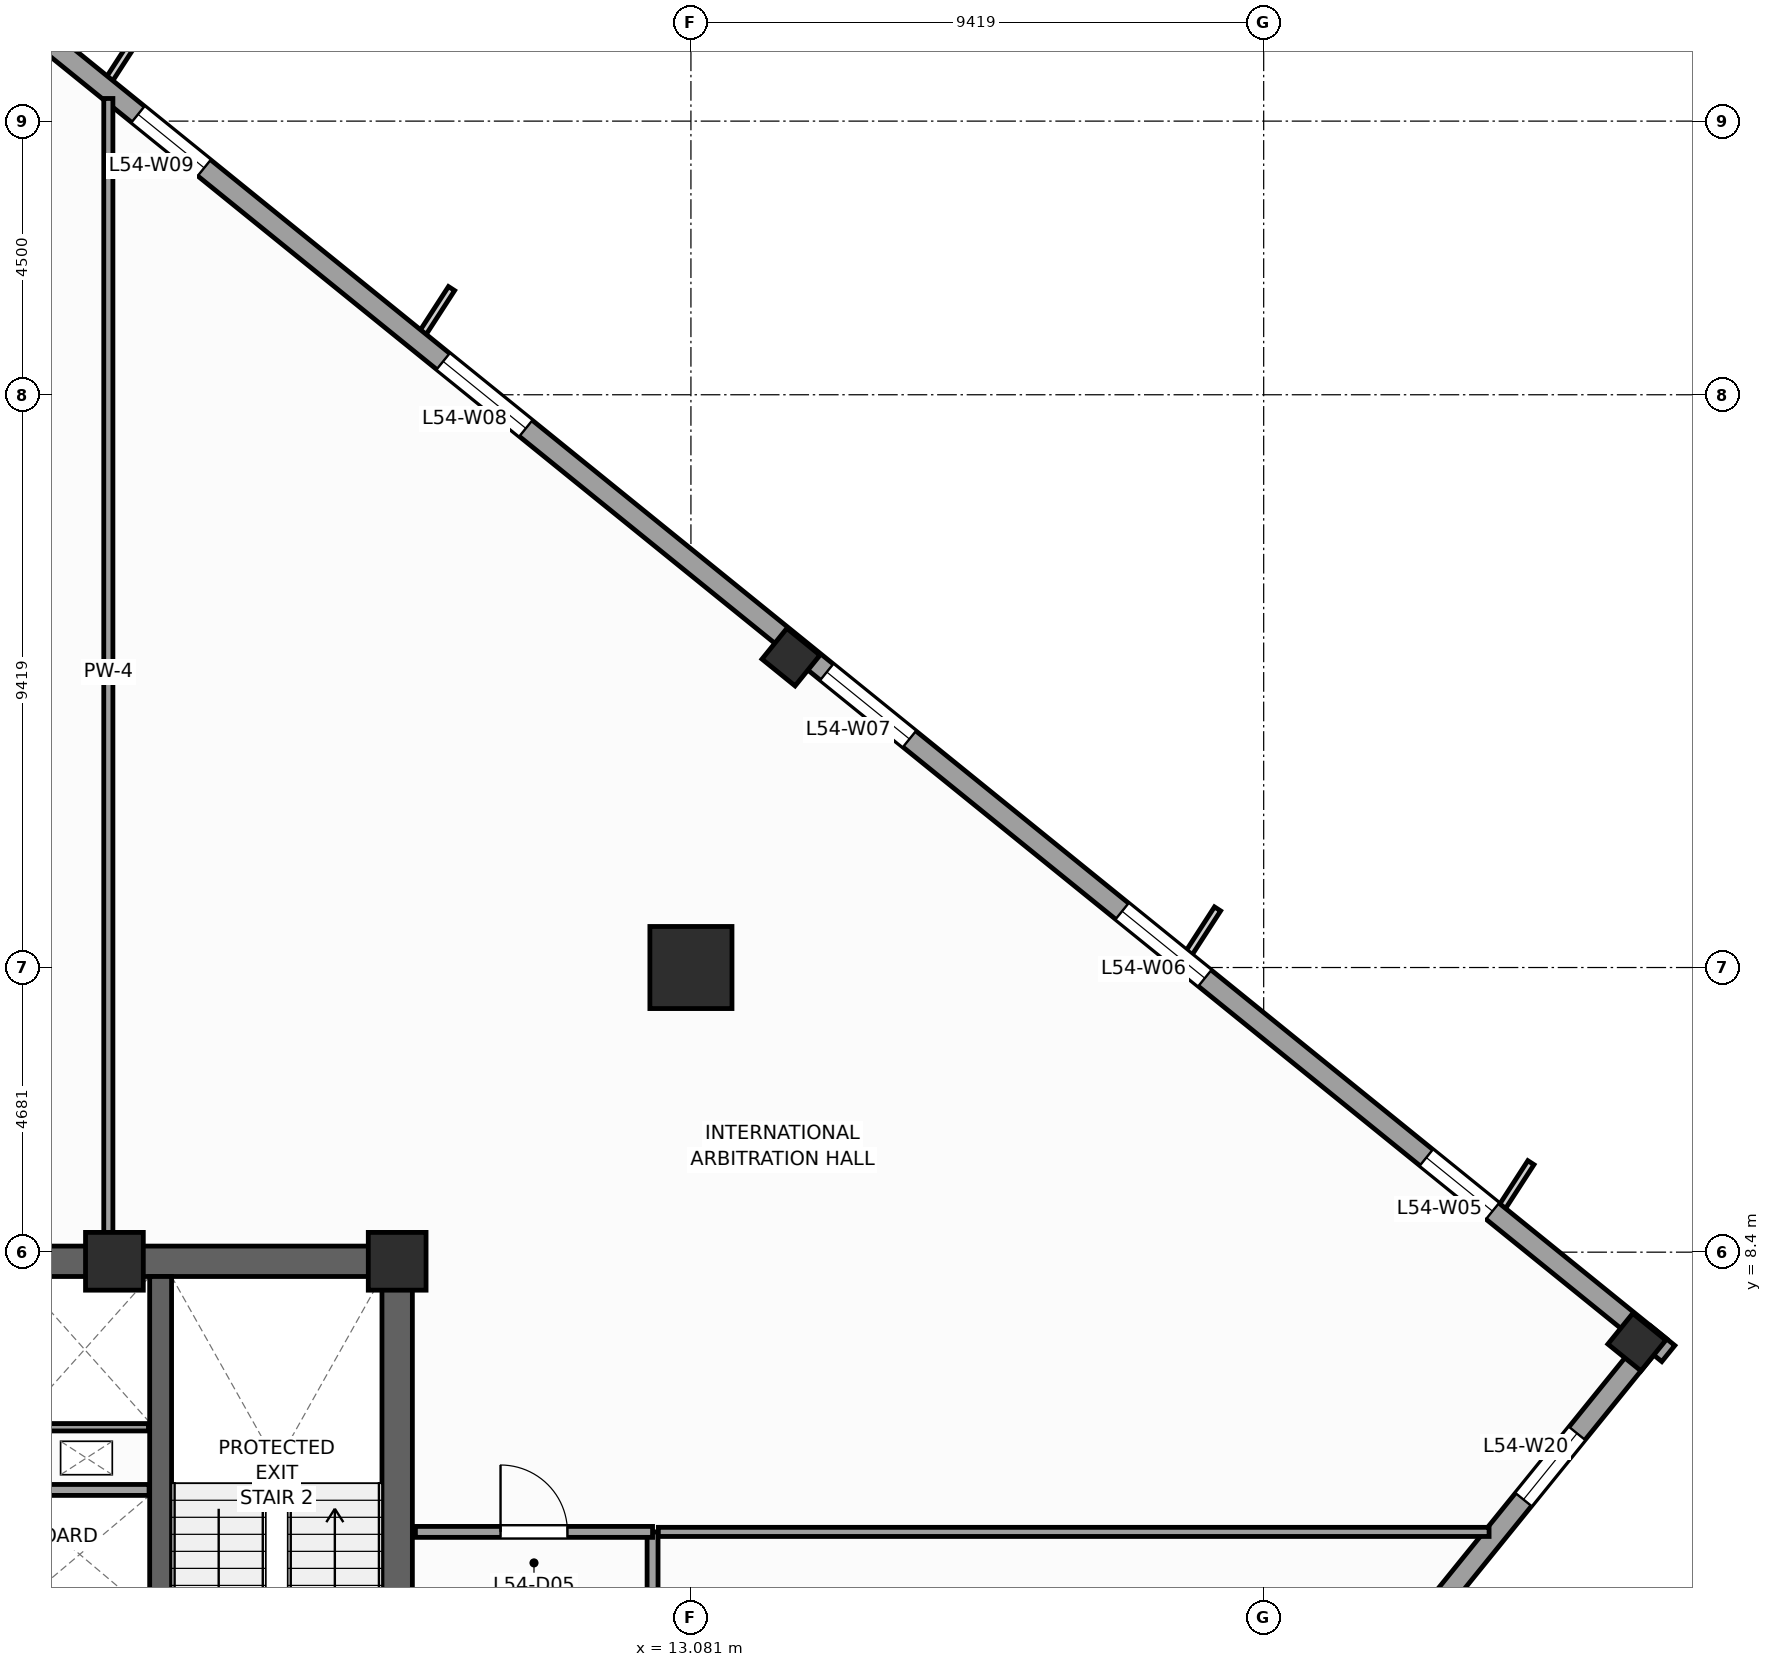
"""IFC4 building model, lengths in metres.
Left out: names, types, materials, properties, quantities, classifications, styles, units other than length and angle.
Written with IfcOpenShell. Run it as: python <this file> out.ifc"""

import sys

from ifc_helpers import new_model, si_unit, direction, frame, frame_2d, origin, origin_2d, place, context, subcontext, project, spatial, rectangle, extrude, source, transform, mapped, element, fill, save


model = new_model("IFC4")
c1 = context("Model", 3, precision=1e-05, world=origin(), true_north=direction((0.0, 1.0)))
c2 = subcontext(c1, "Body", "Model", "MODEL_VIEW")
j1 = project(units=[si_unit("LENGTHUNIT", "METRE"), si_unit("PLANEANGLEUNIT", "RADIAN")], contexts=[c1])
p1 = place(None, origin())
s1 = spatial("IfcSite", under=j1, at=p1, CompositionType="ELEMENT")
p2 = place(p1, origin())
s2 = spatial("IfcBuilding", under=s1, at=p2, CompositionType="ELEMENT")
p3 = place(p2, frame((0.0, 0.0, 225.1)))
s3 = spatial("IfcBuildingStorey", under=s2, at=p3, CompositionType="ELEMENT", Elevation=225.1)
p4 = place(p3, frame((-8.5, 8.25, 0.0), z_axis=(0.0, 0.0, 1.0), x_axis=(1.0, 0.0, 0.0)))
e1 = element("IfcWall", 1, at=p4, inside=s3, PredefinedType="SHEAR", context=c2, shape_type="SweptSolid", body=[
    extrude(rectangle(XDim=17.0, YDim=0.5, at=frame_2d((8.5, 0.0))), origin(), (0.0, 0.0, 1.0), 3.9),
])
p5 = place(p3, frame((8.25, -8.0, 0.0), z_axis=(0.0, 0.0, 1.0), x_axis=(0.0, 1.0, 0.0)))
e2 = element("IfcWall", 2, at=p5, inside=s3, PredefinedType="SHEAR", context=c2, shape_type="SweptSolid", body=[
    extrude(rectangle(XDim=16.0, YDim=0.5, at=frame_2d((8.0, 0.0))), origin(), (0.0, 0.0, 1.0), 3.9),
])
p6 = place(p5, frame((4.69, 0.0, 0.0)))
e3 = element("IfcOpeningElement", 3, at=p6, cuts=e2, PredefinedType="OPENING", context=c2, shape_type="SweptSolid", body=[
    extrude(rectangle(XDim=1.3, YDim=2.2, at=frame_2d((0.65, 1.1))), frame((0.0, 0.26, 0.0), z_axis=(0.0, -1.0, 0.0), x_axis=(1.0, 0.0, 0.0)), (0.0, 0.0, 1.0), 0.52),
])
p7 = place(p3, frame((4.36, -8.0, 0.0), z_axis=(0.0, 0.0, 1.0), x_axis=(0.0, 1.0, 0.0)))
e4 = element("IfcWall", 4, at=p7, inside=s3, PredefinedType="SHEAR", context=c2, shape_type="SweptSolid", body=[
    extrude(rectangle(XDim=16.0, YDim=0.36, at=frame_2d((8.0, 0.0))), origin(), (0.0, 0.0, 1.0), 3.9),
])
m1 = source(origin(), c2, "Body", "SweptSolid", [
    extrude(rectangle(XDim=0.95, YDim=0.95, at=origin_2d()), origin(), (0.0, 0.0, 1.0), 3.9),
])
for number, where, z_axis, x_axis in (
    (5, (8.25, 8.25, 0.0), (0.0, 0.0, 1.0), (1.0, 0.0, 0.0)),
    (6, (3.6, 8.25, 0.0), (0.0, 0.0, 1.0), (1.0, 0.0, 0.0)),
):
    element("IfcColumn", number, at=place(p3, frame(where, z_axis=z_axis, x_axis=x_axis)), inside=s3, PredefinedType="PILASTER", context=c2, shape_type="MappedRepresentation", body=[
        mapped(m1, transform((0.0, 0.0, 0.0), scale=1.0)),
    ])
m2 = source(origin(), c2, "Body", "SweptSolid", [
    extrude(rectangle(XDim=1.35, YDim=1.35, at=origin_2d()), origin(), (0.0, 0.0, 1.0), 3.9),
])
p8 = place(p3, frame((13.081, 13.081, 0.0), z_axis=(0.0, 0.0, 1.0), x_axis=(1.0, 0.0, 0.0)))
e7 = element("IfcColumn", 7, at=p8, inside=s3, PredefinedType="COLUMN", context=c2, shape_type="MappedRepresentation", body=[
    mapped(m2, transform((0.0, 0.0, 0.0), scale=1.0)),
])
m3 = source(origin(), c2, "Body", "SweptSolid", [
    extrude(rectangle(XDim=0.65, YDim=0.7, at=origin_2d()), origin(), (0.0, 0.0, 1.0), 3.9),
])
for number, where, z_axis, x_axis in (
    (8, (28.637, 6.92, 0.0), (0.0, 0.0, 1.0), (0.629, 0.777, 0.0)),
    (9, (14.726, 18.185, 0.0), (0.0, 0.0, 1.0), (0.629, 0.777, 0.0)),
):
    element("IfcColumn", number, at=place(p3, frame(where, z_axis=z_axis, x_axis=x_axis)), inside=s3, PredefinedType="COLUMN", context=c2, shape_type="MappedRepresentation", body=[
        mapped(m3, transform((0.0, 0.0, 0.0), scale=1.0)),
    ])
p9 = place(p3, frame((25.429, 2.673, 0.0), z_axis=(0.0, 0.0, 1.0), x_axis=(0.629299794138, 0.777162640055, 0.0)))
e10 = element("IfcWall", 10, at=p9, inside=s3, PredefinedType="STANDARD", context=c2, shape_type="SweptSolid", body=[
    extrude(rectangle(XDim=5.67, YDim=0.34, at=frame_2d((2.835, 0.0))), origin(), (0.0, 0.0, 1.0), 3.66),
])
p10 = place(p9, frame((2.135, 0.0, 0.48)))
e11 = element("IfcOpeningElement", 11, at=p10, cuts=e10, PredefinedType="OPENING", context=c2, shape_type="SweptSolid", body=[
    extrude(rectangle(XDim=1.4, YDim=2.4, at=frame_2d((0.7, 1.2))), frame((0.0, 0.18, 0.0), z_axis=(0.0, -1.0, 0.0), x_axis=(1.0, 0.0, 0.0)), (0.0, 0.0, 1.0), 0.36),
])
p11 = place(p3, frame((29.154, 6.733, 0.0), z_axis=(0.0, 0.0, 1.0), x_axis=(-0.77714192302, 0.629325378072, 0.0)))
e12 = element("IfcWall", 12, at=p11, inside=s3, PredefinedType="STANDARD", context=c2, shape_type="SweptSolid", body=[
    extrude(rectangle(XDim=36.84, YDim=0.34, at=frame_2d((18.42, 0.0))), origin(), (0.0, 0.0, 1.0), 2.96),
])
p12 = place(p11, frame((3.721, 0.0, 0.48)))
e13 = element("IfcOpeningElement", 13, at=p12, cuts=e12, PredefinedType="OPENING", context=c2, shape_type="SweptSolid", body=[
    extrude(rectangle(XDim=1.4, YDim=2.4, at=frame_2d((0.7, 1.2))), frame((0.0, 0.18, 0.0), z_axis=(0.0, -1.0, 0.0), x_axis=(1.0, 0.0, 0.0)), (0.0, 0.0, 1.0), 0.36),
])
p13 = place(p11, frame((9.809, 0.0, 0.58)))
e14 = element("IfcOpeningElement", 14, at=p13, cuts=e12, PredefinedType="OPENING", context=c2, shape_type="SweptSolid", body=[
    extrude(rectangle(XDim=1.75, YDim=2.3, at=frame_2d((0.875, 1.15))), frame((0.0, 0.18, 0.0), z_axis=(0.0, -1.0, 0.0), x_axis=(1.0, 0.0, 0.0)), (0.0, 0.0, 1.0), 0.36),
])
p14 = place(p11, frame((16.058, 0.0, 0.58)))
e15 = element("IfcOpeningElement", 15, at=p14, cuts=e12, PredefinedType="OPENING", context=c2, shape_type="SweptSolid", body=[
    extrude(rectangle(XDim=1.75, YDim=2.3, at=frame_2d((0.875, 1.15))), frame((0.0, 0.18, 0.0), z_axis=(0.0, -1.0, 0.0), x_axis=(1.0, 0.0, 0.0)), (0.0, 0.0, 1.0), 0.36),
])
p15 = place(p11, frame((24.176, 0.0, 0.58)))
e16 = element("IfcOpeningElement", 16, at=p15, cuts=e12, PredefinedType="OPENING", context=c2, shape_type="SweptSolid", body=[
    extrude(rectangle(XDim=1.75, YDim=2.3, at=frame_2d((0.875, 1.15))), frame((0.0, 0.18, 0.0), z_axis=(0.0, -1.0, 0.0), x_axis=(1.0, 0.0, 0.0)), (0.0, 0.0, 1.0), 0.36),
])
p16 = place(p11, frame((30.982, 0.0, 0.48)))
e17 = element("IfcOpeningElement", 17, at=p16, cuts=e12, PredefinedType="OPENING", context=c2, shape_type="SweptSolid", body=[
    extrude(rectangle(XDim=1.4, YDim=2.4, at=frame_2d((0.7, 1.2))), frame((0.0, 0.18, 0.0), z_axis=(0.0, -1.0, 0.0), x_axis=(1.0, 0.0, 0.0)), (0.0, 0.0, 1.0), 0.36),
])
p17 = place(p3, frame((1.89, 4.49, 0.0), z_axis=(0.0, 0.0, 1.0), x_axis=(1.0, 0.0, 0.0)))
e18 = element("IfcWall", 18, at=p17, inside=s3, PredefinedType="PARTITIONING", context=c2, shape_type="SweptSolid", body=[
    extrude(rectangle(XDim=2.28, YDim=0.18, at=frame_2d((1.14, 0.0))), origin(), (0.0, 0.0, 1.0), 3.66),
])
p18 = place(p3, frame((2.06, 5.52, 0.0), z_axis=(0.0, 0.0, 1.0), x_axis=(1.0, 0.0, 0.0)))
e19 = element("IfcWall", 19, at=p18, inside=s3, PredefinedType="PARTITIONING", context=c2, shape_type="SweptSolid", body=[
    extrude(rectangle(XDim=2.1, YDim=0.12, at=frame_2d((1.05, 0.0))), origin(), (0.0, 0.0, 1.0), 3.66),
])
p19 = place(p3, frame((12.45, -12.35, 0.0), z_axis=(0.0, 0.0, 1.0), x_axis=(0.0, 1.0, 0.0)))
e20 = element("IfcWall", 20, at=p19, inside=s3, PredefinedType="PARTITIONING", context=c2, shape_type="SweptSolid", body=[
    extrude(rectangle(XDim=16.15, YDim=0.18, at=frame_2d((8.075, 0.0))), origin(), (0.0, 0.0, 1.0), 3.66),
])
p20 = place(p19, frame((1.58, 0.0, 0.0)))
e21 = element("IfcOpeningElement", 21, at=p20, cuts=e20, PredefinedType="OPENING", context=c2, shape_type="SweptSolid", body=[
    extrude(rectangle(XDim=0.95, YDim=2.1, at=frame_2d((0.475, 1.05))), frame((0.0, 0.1, 0.0), z_axis=(0.0, -1.0, 0.0), x_axis=(1.0, 0.0, 0.0)), (0.0, 0.0, 1.0), 0.2),
])
p21 = place(p19, frame((14.111, 0.0, 0.0)))
e22 = element("IfcOpeningElement", 22, at=p21, cuts=e20, PredefinedType="OPENING", context=c2, shape_type="SweptSolid", body=[
    extrude(rectangle(XDim=1.1, YDim=2.2, at=frame_2d((0.55, 1.1))), frame((0.0, 0.1, 0.0), z_axis=(0.0, -1.0, 0.0), x_axis=(1.0, 0.0, 0.0)), (0.0, 0.0, 1.0), 0.2),
])
p22 = place(p19, frame((7.784, 0.0, 0.0)))
e23 = element("IfcOpeningElement", 23, at=p22, cuts=e20, PredefinedType="OPENING", context=c2, shape_type="SweptSolid", body=[
    extrude(rectangle(XDim=1.1, YDim=2.2, at=frame_2d((0.55, 1.1))), frame((0.0, 0.1, 0.0), z_axis=(0.0, -1.0, 0.0), x_axis=(1.0, 0.0, 0.0)), (0.0, 0.0, 1.0), 0.2),
])
p23 = place(p3, frame((8.55, 3.8, 0.0), z_axis=(0.0, 0.0, 1.0), x_axis=(1.0, 0.0, 0.0)))
e24 = element("IfcWall", 24, at=p23, inside=s3, PredefinedType="PARTITIONING", context=c2, shape_type="SweptSolid", body=[
    extrude(rectangle(XDim=3.9, YDim=0.18, at=frame_2d((1.95, 0.0))), origin(), (0.0, 0.0, 1.0), 3.66),
])
p24 = place(p23, frame((1.4, 0.0, 0.0)))
e25 = element("IfcOpeningElement", 25, at=p24, cuts=e24, PredefinedType="OPENING", context=c2, shape_type="SweptSolid", body=[
    extrude(rectangle(XDim=1.1, YDim=2.2, at=frame_2d((0.55, 1.1))), frame((0.0, 0.1, 0.0), z_axis=(0.0, -1.0, 0.0), x_axis=(1.0, 0.0, 0.0)), (0.0, 0.0, 1.0), 0.2),
])
p25 = place(p3, frame((3.5, 8.505, 0.0), z_axis=(0.0, 0.0, 1.0), x_axis=(0.0, 1.0, 0.0)))
e26 = element("IfcWall", 26, at=p25, inside=s3, PredefinedType="PARTITIONING", context=c2, shape_type="SweptSolid", body=[
    extrude(rectangle(XDim=18.868, YDim=0.15, at=frame_2d((9.434, 0.0))), origin(), (0.0, 0.0, 1.0), 3.66),
])
p26 = place(p3, frame((12.545, 3.8, 0.0), z_axis=(0.0, 0.0, 1.0), x_axis=(1.0, 0.0, 0.0)))
e27 = element("IfcWall", 27, at=p26, inside=s3, PredefinedType="PARTITIONING", context=c2, shape_type="SweptSolid", body=[
    extrude(rectangle(XDim=13.662, YDim=0.15, at=frame_2d((6.831, 0.0))), origin(), (0.0, 0.0, 1.0), 3.66),
])
m4 = source(origin(), c2, "Body", "SweptSolid", [
    extrude(rectangle(XDim=1.4, YDim=2.4, at=frame_2d((0.7, 1.2))), frame((0.0, 0.03, 0.0), z_axis=(0.0, -1.0, 0.0), x_axis=(1.0, 0.0, 0.0)), (0.0, 0.0, 1.0), 0.06),
])
p27 = place(p12, origin())
e28 = element("IfcWindow", 28, at=p27, inside=s3, PartitioningType="SINGLE_PANEL", PredefinedType="WINDOW", context=c2, shape_type="MappedRepresentation", body=[
    mapped(m4, transform((0.0, 0.0, 0.0), scale=1.0)),
])
fill(e13, e28)
m5 = source(origin(), c2, "Body", "SweptSolid", [
    extrude(rectangle(XDim=1.75, YDim=2.3, at=frame_2d((0.875, 1.15))), frame((0.0, 0.03, 0.0), z_axis=(0.0, -1.0, 0.0), x_axis=(1.0, 0.0, 0.0)), (0.0, 0.0, 1.0), 0.06),
])
p28 = place(p13, origin())
e29 = element("IfcWindow", 29, at=p28, inside=s3, PartitioningType="SINGLE_PANEL", PredefinedType="WINDOW", context=c2, shape_type="MappedRepresentation", body=[
    mapped(m5, transform((0.0, 0.0, 0.0), scale=1.0)),
])
fill(e14, e29)
p29 = place(p14, origin())
e30 = element("IfcWindow", 30, at=p29, inside=s3, PartitioningType="SINGLE_PANEL", PredefinedType="WINDOW", context=c2, shape_type="MappedRepresentation", body=[
    mapped(m5, transform((0.0, 0.0, 0.0), scale=1.0)),
])
fill(e15, e30)
p30 = place(p15, origin())
e31 = element("IfcWindow", 31, at=p30, inside=s3, PartitioningType="SINGLE_PANEL", PredefinedType="WINDOW", context=c2, shape_type="MappedRepresentation", body=[
    mapped(m5, transform((0.0, 0.0, 0.0), scale=1.0)),
])
fill(e16, e31)
p31 = place(p16, origin())
e32 = element("IfcWindow", 32, at=p31, inside=s3, PartitioningType="SINGLE_PANEL", PredefinedType="WINDOW", context=c2, shape_type="MappedRepresentation", body=[
    mapped(m4, transform((0.0, 0.0, 0.0), scale=1.0)),
])
fill(e17, e32)
p32 = place(p10, origin())
e33 = element("IfcWindow", 33, at=p32, inside=s3, PartitioningType="SINGLE_PANEL", PredefinedType="WINDOW", context=c2, shape_type="MappedRepresentation", body=[
    mapped(m4, transform((0.0, 0.0, 0.0), scale=1.0)),
])
fill(e11, e33)
m6 = source(origin(), c2, "Body", "SweptSolid", [
    extrude(rectangle(XDim=1.1, YDim=2.2, at=frame_2d((0.55, 1.1))), frame((0.0, 0.025, 0.0), z_axis=(0.0, -1.0, 0.0), x_axis=(1.0, 0.0, 0.0)), (0.0, 0.0, 1.0), 0.05),
])
p33 = place(p24, origin())
e34 = element("IfcDoor", 34, at=p33, inside=s3, OperationType="SINGLE_SWING_LEFT", PredefinedType="DOOR", context=c2, shape_type="MappedRepresentation", body=[
    mapped(m6, transform((0.0, 0.0, 0.0), scale=1.0)),
])
fill(e25, e34)
save(model, sys.argv[1])
